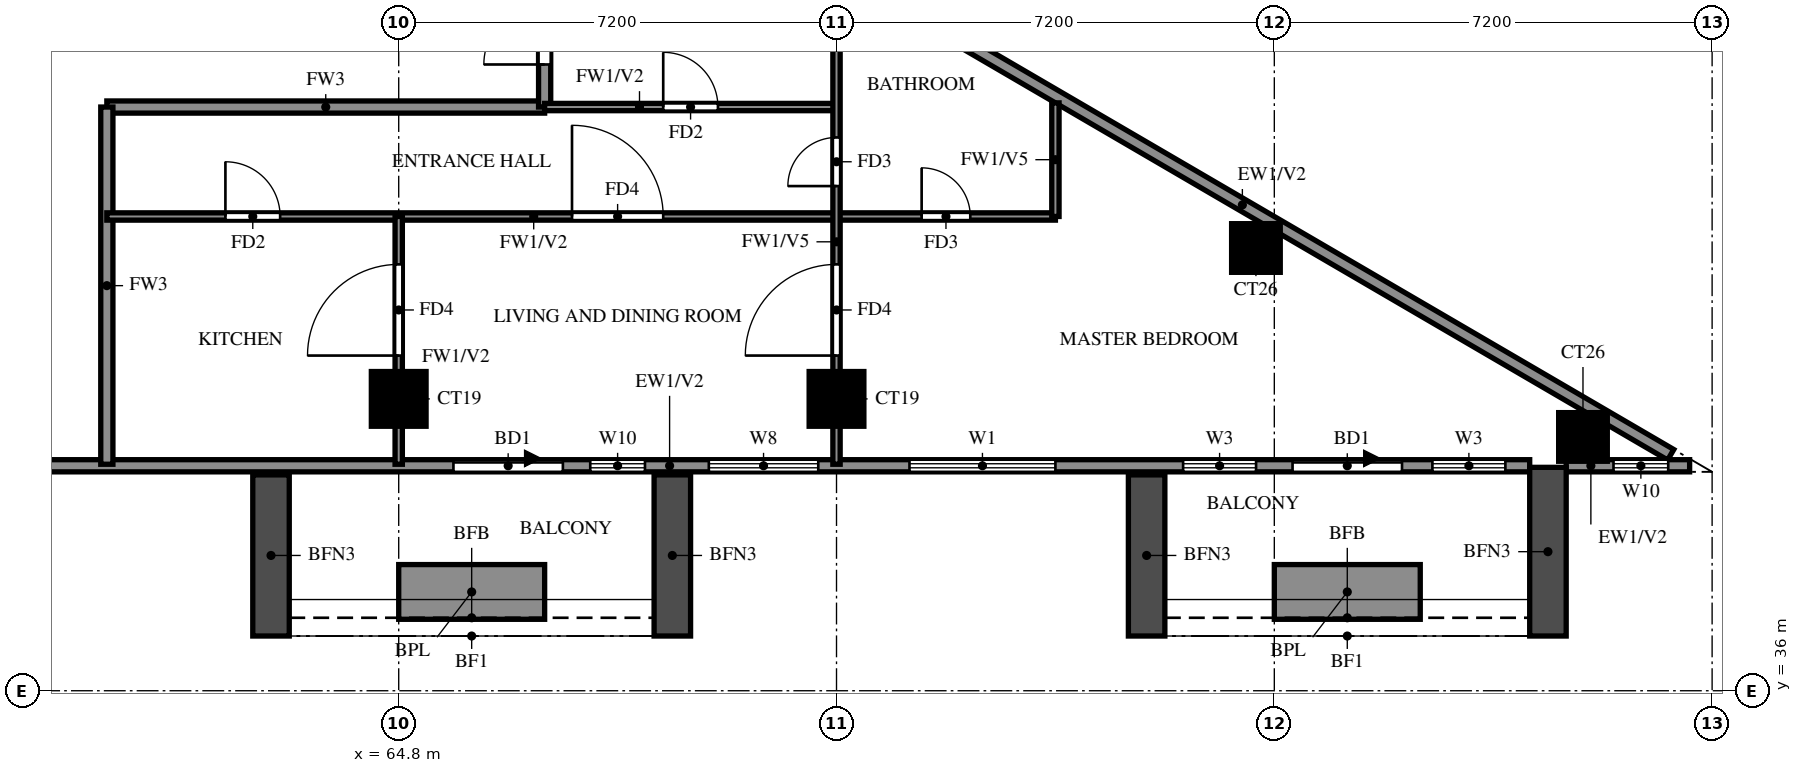
"""IFC4 building model, lengths in metres.
Left out: names, types, materials, properties, quantities, classifications, styles, units other than length and angle.
Written with IfcOpenShell. Run it as: python <this file> out.ifc"""

import sys

from ifc_helpers import new_model, si_unit, direction, frame, frame_2d, origin, origin_2d, place, context, subcontext, project, spatial, rectangle, extrude, source, transform, mapped, element, fill, save


model = new_model("IFC4")
c1 = context("Model", 3, precision=1e-05, world=origin(), true_north=direction((0.0, 1.0)))
c2 = subcontext(c1, "Body", "Model", "MODEL_VIEW")
j1 = project(units=[si_unit("LENGTHUNIT", "METRE"), si_unit("PLANEANGLEUNIT", "RADIAN")], contexts=[c1])
p1 = place(None, origin())
s1 = spatial("IfcSite", under=j1, at=p1, CompositionType="ELEMENT")
p2 = place(p1, origin())
s2 = spatial("IfcBuilding", under=s1, at=p2, CompositionType="ELEMENT")
p3 = place(p2, frame((0.0, 0.0, 192.0)))
s3 = spatial("IfcBuildingStorey", under=s2, at=p3, CompositionType="ELEMENT", Elevation=192.0)
m1 = source(origin(), c2, "Body", "SweptSolid", [
    extrude(rectangle(XDim=0.8, YDim=0.8, at=origin_2d()), origin(), (0.0, 0.0, 1.0), 3.2),
])
p4 = place(p3, frame((84.276, 40.174, 0.0), z_axis=(0.0, 0.0, 1.0), x_axis=(1.0, 0.0, 0.0)))
e1 = element("IfcColumn", 1, at=p4, inside=s3, PredefinedType="COLUMN", context=c2, shape_type="MappedRepresentation", body=[
    mapped(m1, transform((0.0, 0.0, 0.0))),
])
m2 = source(origin(), c2, "Body", "SweptSolid", [
    extrude(rectangle(XDim=0.9, YDim=0.9, at=origin_2d()), origin(), (0.0, 0.0, 1.0), 3.2),
])
for number, where, z_axis, x_axis in (
    (2, (64.8, 40.8, 0.0), (0.0, 0.0, 1.0), (1.0, 0.0, 0.0)),
    (3, (72.0, 40.8, 0.0), (0.0, 0.0, 1.0), (1.0, 0.0, 0.0)),
):
    element("IfcColumn", number, at=place(p3, frame(where, z_axis=z_axis, x_axis=x_axis)), inside=s3, PredefinedType="COLUMN", context=c2, shape_type="MappedRepresentation", body=[
        mapped(m2, transform((0.0, 0.0, 0.0))),
    ])
p5 = place(p3, frame((78.898, 43.282, 0.0), z_axis=(0.0, 0.0, 1.0), x_axis=(1.0, 0.0, 0.0)))
e4 = element("IfcColumn", 4, at=p5, inside=s3, PredefinedType="COLUMN", context=c2, shape_type="MappedRepresentation", body=[
    mapped(m1, transform((0.0, 0.0, 0.0))),
])
p6 = place(p3, frame((85.719, 39.881, 0.0), z_axis=(0.0, 0.0, 1.0), x_axis=(-0.86377618652, 0.503875678716, 0.0)))
e5 = element("IfcWall", 5, at=p6, inside=s3, PredefinedType="SOLIDWALL", context=c2, shape_type="SweptSolid", body=[
    extrude(rectangle(XDim=16.311, YDim=0.2, at=frame_2d((8.156, 0.0))), origin(), (0.0, 0.0, 1.0), 3.2),
])
p7 = place(p6, frame((13.326, 0.0, 1.5)))
e6 = element("IfcOpeningElement", 6, at=p7, cuts=e5, PredefinedType="OPENING", context=c2, shape_type="SweptSolid", body=[
    extrude(rectangle(XDim=0.9, YDim=0.9, at=frame_2d((0.45, 0.45))), frame((0.0, 0.11, 0.0), z_axis=(0.0, -1.0, 0.0), x_axis=(1.0, 0.0, 0.0)), (0.0, 0.0, 1.0), 0.22),
])
p8 = place(p3, frame((58.8, 39.7, 0.0), z_axis=(0.0, 0.0, 1.0), x_axis=(1.0, 0.0, 0.0)))
e7 = element("IfcWall", 7, at=p8, inside=s3, PredefinedType="SOLIDWALL", context=c2, shape_type="SweptSolid", body=[
    extrude(rectangle(XDim=24.6, YDim=0.2, at=frame_2d((12.3, 0.0))), origin(), (0.0, 0.0, 1.0), 3.2),
])
p9 = place(p8, frame((6.9, 0.0, 0.0)))
e8 = element("IfcOpeningElement", 8, at=p9, cuts=e7, PredefinedType="OPENING", context=c2, shape_type="SweptSolid", body=[
    extrude(rectangle(XDim=1.8, YDim=2.4, at=frame_2d((0.9, 1.2))), frame((0.0, 0.11, 0.0), z_axis=(0.0, -1.0, 0.0), x_axis=(1.0, 0.0, 0.0)), (0.0, 0.0, 1.0), 0.22),
])
p10 = place(p8, frame((20.7, 0.0, 0.0)))
e9 = element("IfcOpeningElement", 9, at=p10, cuts=e7, PredefinedType="OPENING", context=c2, shape_type="SweptSolid", body=[
    extrude(rectangle(XDim=1.8, YDim=2.4, at=frame_2d((0.9, 1.2))), frame((0.0, 0.11, 0.0), z_axis=(0.0, -1.0, 0.0), x_axis=(1.0, 0.0, 0.0)), (0.0, 0.0, 1.0), 0.22),
])
p11 = place(p8, frame((9.15, 0.0, 0.6)))
e10 = element("IfcOpeningElement", 10, at=p11, cuts=e7, PredefinedType="OPENING", context=c2, shape_type="SweptSolid", body=[
    extrude(rectangle(XDim=0.9, YDim=2.4, at=frame_2d((0.45, 1.2))), frame((0.0, 0.11, 0.0), z_axis=(0.0, -1.0, 0.0), x_axis=(1.0, 0.0, 0.0)), (0.0, 0.0, 1.0), 0.22),
])
p12 = place(p8, frame((11.1, 0.0, 0.6)))
e11 = element("IfcOpeningElement", 11, at=p12, cuts=e7, PredefinedType="OPENING", context=c2, shape_type="SweptSolid", body=[
    extrude(rectangle(XDim=1.8, YDim=2.4, at=frame_2d((0.9, 1.2))), frame((0.0, 0.11, 0.0), z_axis=(0.0, -1.0, 0.0), x_axis=(1.0, 0.0, 0.0)), (0.0, 0.0, 1.0), 0.22),
])
p13 = place(p8, frame((14.4, 0.0, 0.6)))
e12 = element("IfcOpeningElement", 12, at=p13, cuts=e7, PredefinedType="OPENING", context=c2, shape_type="SweptSolid", body=[
    extrude(rectangle(XDim=2.4, YDim=2.4, at=frame_2d((1.2, 1.2))), frame((0.0, 0.11, 0.0), z_axis=(0.0, -1.0, 0.0), x_axis=(1.0, 0.0, 0.0)), (0.0, 0.0, 1.0), 0.22),
])
p14 = place(p8, frame((18.9, 0.0, 0.6)))
e13 = element("IfcOpeningElement", 13, at=p14, cuts=e7, PredefinedType="OPENING", context=c2, shape_type="SweptSolid", body=[
    extrude(rectangle(XDim=1.2, YDim=2.4, at=frame_2d((0.6, 1.2))), frame((0.0, 0.11, 0.0), z_axis=(0.0, -1.0, 0.0), x_axis=(1.0, 0.0, 0.0)), (0.0, 0.0, 1.0), 0.22),
])
p15 = place(p8, frame((23.0, 0.0, 0.6)))
e14 = element("IfcOpeningElement", 14, at=p15, cuts=e7, PredefinedType="OPENING", context=c2, shape_type="SweptSolid", body=[
    extrude(rectangle(XDim=1.2, YDim=2.4, at=frame_2d((0.6, 1.2))), frame((0.0, 0.11, 0.0), z_axis=(0.0, -1.0, 0.0), x_axis=(1.0, 0.0, 0.0)), (0.0, 0.0, 1.0), 0.22),
])
p16 = place(p3, frame((84.0, 39.7, 0.0), z_axis=(0.0, 0.0, 1.0), x_axis=(1.0, 0.0, 0.0)))
e15 = element("IfcWall", 15, at=p16, inside=s3, PredefinedType="SOLIDWALL", context=c2, shape_type="SweptSolid", body=[
    extrude(rectangle(XDim=2.03, YDim=0.2, at=frame_2d((1.015, 0.0))), origin(), (0.0, 0.0, 1.0), 3.2),
])
p17 = place(p16, frame((0.778, 0.0, 0.6)))
e16 = element("IfcOpeningElement", 16, at=p17, cuts=e15, PredefinedType="OPENING", context=c2, shape_type="SweptSolid", body=[
    extrude(rectangle(XDim=0.9, YDim=2.4, at=frame_2d((0.45, 1.2))), frame((0.0, 0.11, 0.0), z_axis=(0.0, -1.0, 0.0), x_axis=(1.0, 0.0, 0.0)), (0.0, 0.0, 1.0), 0.22),
])
for number, where, z_axis, x_axis in (
    (17, (62.7, 39.55, 0.0), (0.0, 0.0, 1.0), (0.0, -1.0, 0.0)),
    (18, (69.3, 39.55, 0.0), (0.0, 0.0, 1.0), (0.0, -1.0, 0.0)),
):
    element("IfcWall", number, at=place(p3, frame(where, z_axis=z_axis, x_axis=x_axis)), inside=s3, PredefinedType="SOLIDWALL", context=c2, shape_type="SweptSolid", body=[
        extrude(rectangle(XDim=2.65, YDim=0.6, at=frame_2d((1.325, 0.0))), origin(), (0.0, 0.0, 1.0), 2.85),
    ])
p18 = place(p3, frame((64.8, 37.625, 0.0), z_axis=(0.0, 0.0, 1.0), x_axis=(1.0, 0.0, 0.0)))
e19 = element("IfcWall", 19, at=p18, inside=s3, PredefinedType="SOLIDWALL", context=c2, shape_type="SweptSolid", body=[
    extrude(rectangle(XDim=2.4, YDim=0.9, at=frame_2d((1.2, 0.0))), origin(), (0.0, 0.0, 1.0), 0.9),
])
p19 = place(p3, frame((77.1, 39.55, 0.0), z_axis=(0.0, 0.0, 1.0), x_axis=(0.0, -1.0, 0.0)))
e20 = element("IfcWall", 20, at=p19, inside=s3, PredefinedType="SOLIDWALL", context=c2, shape_type="SweptSolid", body=[
    extrude(rectangle(XDim=2.65, YDim=0.6, at=frame_2d((1.325, 0.0))), origin(), (0.0, 0.0, 1.0), 2.85),
])
p20 = place(p3, frame((83.7, 39.674, 0.0), z_axis=(0.0, 0.0, 1.0), x_axis=(0.0, -1.0, 0.0)))
e21 = element("IfcWall", 21, at=p20, inside=s3, PredefinedType="SOLIDWALL", context=c2, shape_type="SweptSolid", body=[
    extrude(rectangle(XDim=2.774, YDim=0.6, at=frame_2d((1.387, 0.0))), origin(), (0.0, 0.0, 1.0), 2.85),
])
p21 = place(p3, frame((79.2, 37.625, 0.0), z_axis=(0.0, 0.0, 1.0), x_axis=(1.0, 0.0, 0.0)))
e22 = element("IfcWall", 22, at=p21, inside=s3, PredefinedType="SOLIDWALL", context=c2, shape_type="SweptSolid", body=[
    extrude(rectangle(XDim=2.4, YDim=0.9, at=frame_2d((1.2, 0.0))), origin(), (0.0, 0.0, 1.0), 0.9),
])
p22 = place(p3, frame((60.0, 45.6, 0.0), z_axis=(0.0, 0.0, 1.0), x_axis=(1.0, 0.0, 0.0)))
e23 = element("IfcWall", 23, at=p22, inside=s3, PredefinedType="SOLIDWALL", context=c2, shape_type="SweptSolid", body=[
    extrude(rectangle(XDim=7.2, YDim=0.2, at=frame_2d((3.6, 0.0))), origin(), (0.0, 0.0, 1.0), 3.2),
])
p23 = place(p3, frame((60.0, 39.725, 0.0), z_axis=(0.0, 0.0, 1.0), x_axis=(0.0, 1.0, 0.0)))
e24 = element("IfcWall", 24, at=p23, inside=s3, PredefinedType="SOLIDWALL", context=c2, shape_type="SweptSolid", body=[
    extrude(rectangle(XDim=5.875, YDim=0.2, at=frame_2d((2.938, 0.0))), origin(), (0.0, 0.0, 1.0), 3.2),
])
p24 = place(p3, frame((67.2, 45.6, 0.0), z_axis=(0.0, 0.0, 1.0), x_axis=(0.0, 1.0, 0.0)))
e25 = element("IfcWall", 25, at=p24, inside=s3, PredefinedType="SOLIDWALL", context=c2, shape_type="SweptSolid", body=[
    extrude(rectangle(XDim=16.8, YDim=0.2, at=frame_2d((8.4, 0.0))), origin(), (0.0, 0.0, 1.0), 3.2),
])
p25 = place(p24, frame((8.3, 0.0, 0.0)))
e26 = element("IfcOpeningElement", 26, at=p25, cuts=e25, PredefinedType="OPENING", context=c2, shape_type="SweptSolid", body=[
    extrude(rectangle(XDim=1.0, YDim=2.1, at=frame_2d((0.5, 1.05))), frame((0.0, 0.11, 0.0), z_axis=(0.0, -1.0, 0.0), x_axis=(1.0, 0.0, 0.0)), (0.0, 0.0, 1.0), 0.22),
])
p26 = place(p24, frame((15.1, 0.0, 0.0)))
e27 = element("IfcOpeningElement", 27, at=p26, cuts=e25, PredefinedType="OPENING", context=c2, shape_type="SweptSolid", body=[
    extrude(rectangle(XDim=1.0, YDim=2.1, at=frame_2d((0.5, 1.05))), frame((0.0, 0.11, 0.0), z_axis=(0.0, -1.0, 0.0), x_axis=(1.0, 0.0, 0.0)), (0.0, 0.0, 1.0), 0.22),
])
p27 = place(p24, frame((0.7, 0.0, 0.0)))
e28 = element("IfcOpeningElement", 28, at=p27, cuts=e25, PredefinedType="OPENING", context=c2, shape_type="SweptSolid", body=[
    extrude(rectangle(XDim=1.0, YDim=2.1, at=frame_2d((0.5, 1.05))), frame((0.0, 0.11, 0.0), z_axis=(0.0, -1.0, 0.0), x_axis=(1.0, 0.0, 0.0)), (0.0, 0.0, 1.0), 0.22),
])
p28 = place(p3, frame((60.0, 43.8, 0.0), z_axis=(0.0, 0.0, 1.0), x_axis=(1.0, 0.0, 0.0)))
e29 = element("IfcWall", 29, at=p28, inside=s3, PredefinedType="PARTITIONING", context=c2, shape_type="SweptSolid", body=[
    extrude(rectangle(XDim=15.6, YDim=0.12, at=frame_2d((7.8, 0.0))), origin(), (0.0, 0.0, 1.0), 3.2),
])
p29 = place(p28, frame((7.65, 0.0, 0.0)))
e30 = element("IfcOpeningElement", 30, at=p29, cuts=e29, PredefinedType="OPENING", context=c2, shape_type="SweptSolid", body=[
    extrude(rectangle(XDim=1.5, YDim=2.1, at=frame_2d((0.75, 1.05))), frame((0.0, 0.07, 0.0), z_axis=(0.0, -1.0, 0.0), x_axis=(1.0, 0.0, 0.0)), (0.0, 0.0, 1.0), 0.14),
])
p30 = place(p28, frame((1.95, 0.0, 0.0)))
e31 = element("IfcOpeningElement", 31, at=p30, cuts=e29, PredefinedType="OPENING", context=c2, shape_type="SweptSolid", body=[
    extrude(rectangle(XDim=0.9, YDim=2.1, at=frame_2d((0.45, 1.05))), frame((0.0, 0.07, 0.0), z_axis=(0.0, -1.0, 0.0), x_axis=(1.0, 0.0, 0.0)), (0.0, 0.0, 1.0), 0.14),
])
p31 = place(p28, frame((13.4, 0.0, 0.0)))
e32 = element("IfcOpeningElement", 32, at=p31, cuts=e29, PredefinedType="OPENING", context=c2, shape_type="SweptSolid", body=[
    extrude(rectangle(XDim=0.8, YDim=2.1, at=frame_2d((0.4, 1.05))), frame((0.0, 0.07, 0.0), z_axis=(0.0, -1.0, 0.0), x_axis=(1.0, 0.0, 0.0)), (0.0, 0.0, 1.0), 0.14),
])
p32 = place(p3, frame((67.2, 45.6, 0.0), z_axis=(0.0, 0.0, 1.0), x_axis=(1.0, 0.0, 0.0)))
e33 = element("IfcWall", 33, at=p32, inside=s3, PredefinedType="PARTITIONING", context=c2, shape_type="SweptSolid", body=[
    extrude(rectangle(XDim=4.8, YDim=0.12, at=frame_2d((2.4, 0.0))), origin(), (0.0, 0.0, 1.0), 3.2),
])
p33 = place(p32, frame((1.95, 0.0, 0.0)))
e34 = element("IfcOpeningElement", 34, at=p33, cuts=e33, PredefinedType="OPENING", context=c2, shape_type="SweptSolid", body=[
    extrude(rectangle(XDim=0.9, YDim=2.1, at=frame_2d((0.45, 1.05))), frame((0.0, 0.07, 0.0), z_axis=(0.0, -1.0, 0.0), x_axis=(1.0, 0.0, 0.0)), (0.0, 0.0, 1.0), 0.14),
])
p34 = place(p3, frame((64.8, 39.725, 0.0), z_axis=(0.0, 0.0, 1.0), x_axis=(0.0, 1.0, 0.0)))
e35 = element("IfcWall", 35, at=p34, inside=s3, PredefinedType="PARTITIONING", context=c2, shape_type="SweptSolid", body=[
    extrude(rectangle(XDim=4.075, YDim=0.12, at=frame_2d((2.038, 0.0))), origin(), (0.0, 0.0, 1.0), 3.2),
])
p35 = place(p34, frame((1.788, 0.0, 0.0)))
e36 = element("IfcOpeningElement", 36, at=p35, cuts=e35, PredefinedType="OPENING", context=c2, shape_type="SweptSolid", body=[
    extrude(rectangle(XDim=1.5, YDim=2.1, at=frame_2d((0.75, 1.05))), frame((0.0, 0.07, 0.0), z_axis=(0.0, -1.0, 0.0), x_axis=(1.0, 0.0, 0.0)), (0.0, 0.0, 1.0), 0.14),
])
p36 = place(p3, frame((72.0, 39.725, 0.0), z_axis=(0.0, 0.0, 1.0), x_axis=(0.0, 1.0, 0.0)))
e37 = element("IfcWall", 37, at=p36, inside=s3, PredefinedType="PARTITIONING", context=c2, shape_type="SweptSolid", body=[
    extrude(rectangle(XDim=8.13, YDim=0.12, at=frame_2d((4.065, 0.0))), origin(), (0.0, 0.0, 1.0), 2.3),
])
p37 = place(p36, frame((1.788, 0.0, 0.0)))
e38 = element("IfcOpeningElement", 38, at=p37, cuts=e37, PredefinedType="OPENING", context=c2, shape_type="SweptSolid", body=[
    extrude(rectangle(XDim=1.5, YDim=2.1, at=frame_2d((0.75, 1.05))), frame((0.0, 0.07, 0.0), z_axis=(0.0, -1.0, 0.0), x_axis=(1.0, 0.0, 0.0)), (0.0, 0.0, 1.0), 0.14),
])
p38 = place(p36, frame((4.575, 0.0, 0.0)))
e39 = element("IfcOpeningElement", 39, at=p38, cuts=e37, PredefinedType="OPENING", context=c2, shape_type="SweptSolid", body=[
    extrude(rectangle(XDim=0.8, YDim=2.1, at=frame_2d((0.4, 1.05))), frame((0.0, 0.07, 0.0), z_axis=(0.0, -1.0, 0.0), x_axis=(1.0, 0.0, 0.0)), (0.0, 0.0, 1.0), 0.14),
])
p39 = place(p3, frame((75.6, 43.8, 0.0), z_axis=(0.0, 0.0, 1.0), x_axis=(0.0, 1.0, 0.0)))
e40 = element("IfcWall", 40, at=p39, inside=s3, PredefinedType="PARTITIONING", context=c2, shape_type="SweptSolid", body=[
    extrude(rectangle(XDim=1.868, YDim=0.12, at=frame_2d((0.934, 0.0))), origin(), (0.0, 0.0, 1.0), 2.3),
])
p40 = place(p9, origin())
e41 = element("IfcDoor", 41, at=p40, inside=s3, OperationType="DOUBLE_DOOR_SLIDING", PredefinedType="DOOR", context=c2, shape_type="SweptSolid", body=[
    extrude(rectangle(XDim=1.8, YDim=2.4, at=frame_2d((0.9, 1.2))), frame((0.0, 0.025, 0.0), z_axis=(0.0, -1.0, 0.0), x_axis=(1.0, 0.0, 0.0)), (0.0, 0.0, 1.0), 0.05),
])
fill(e8, e41)
p41 = place(p10, origin())
e42 = element("IfcDoor", 42, at=p41, inside=s3, OperationType="DOUBLE_DOOR_SLIDING", PredefinedType="DOOR", context=c2, shape_type="SweptSolid", body=[
    extrude(rectangle(XDim=1.8, YDim=2.4, at=frame_2d((0.9, 1.2))), frame((0.0, 0.025, 0.0), z_axis=(0.0, -1.0, 0.0), x_axis=(1.0, 0.0, 0.0)), (0.0, 0.0, 1.0), 0.05),
])
fill(e9, e42)
p42 = place(p11, origin())
e43 = element("IfcWindow", 43, at=p42, inside=s3, PartitioningType="SINGLE_PANEL", PredefinedType="WINDOW", context=c2, shape_type="SweptSolid", body=[
    extrude(rectangle(XDim=0.9, YDim=2.4, at=frame_2d((0.45, 1.2))), frame((0.0, 0.03, 0.0), z_axis=(0.0, -1.0, 0.0), x_axis=(1.0, 0.0, 0.0)), (0.0, 0.0, 1.0), 0.06),
])
fill(e10, e43)
p43 = place(p12, origin())
e44 = element("IfcWindow", 44, at=p43, inside=s3, PartitioningType="DOUBLE_PANEL_VERTICAL", PredefinedType="WINDOW", context=c2, shape_type="SweptSolid", body=[
    extrude(rectangle(XDim=1.8, YDim=2.4, at=frame_2d((0.9, 1.2))), frame((0.0, 0.03, 0.0), z_axis=(0.0, -1.0, 0.0), x_axis=(1.0, 0.0, 0.0)), (0.0, 0.0, 1.0), 0.06),
])
fill(e11, e44)
p44 = place(p13, origin())
e45 = element("IfcWindow", 45, at=p44, inside=s3, PartitioningType="DOUBLE_PANEL_VERTICAL", PredefinedType="WINDOW", context=c2, shape_type="SweptSolid", body=[
    extrude(rectangle(XDim=2.4, YDim=2.4, at=frame_2d((1.2, 1.2))), frame((0.0, 0.03, 0.0), z_axis=(0.0, -1.0, 0.0), x_axis=(1.0, 0.0, 0.0)), (0.0, 0.0, 1.0), 0.06),
])
fill(e12, e45)
p45 = place(p14, origin())
e46 = element("IfcWindow", 46, at=p45, inside=s3, PartitioningType="SINGLE_PANEL", PredefinedType="WINDOW", context=c2, shape_type="SweptSolid", body=[
    extrude(rectangle(XDim=1.2, YDim=2.4, at=frame_2d((0.6, 1.2))), frame((0.0, 0.03, 0.0), z_axis=(0.0, -1.0, 0.0), x_axis=(1.0, 0.0, 0.0)), (0.0, 0.0, 1.0), 0.06),
])
fill(e13, e46)
p46 = place(p15, origin())
e47 = element("IfcWindow", 47, at=p46, inside=s3, PartitioningType="SINGLE_PANEL", PredefinedType="WINDOW", context=c2, shape_type="SweptSolid", body=[
    extrude(rectangle(XDim=1.2, YDim=2.4, at=frame_2d((0.6, 1.2))), frame((0.0, 0.03, 0.0), z_axis=(0.0, -1.0, 0.0), x_axis=(1.0, 0.0, 0.0)), (0.0, 0.0, 1.0), 0.06),
])
fill(e14, e47)
p47 = place(p17, origin())
e48 = element("IfcWindow", 48, at=p47, inside=s3, PartitioningType="SINGLE_PANEL", PredefinedType="WINDOW", context=c2, shape_type="SweptSolid", body=[
    extrude(rectangle(XDim=0.9, YDim=2.4, at=frame_2d((0.45, 1.2))), frame((0.0, 0.03, 0.0), z_axis=(0.0, -1.0, 0.0), x_axis=(1.0, 0.0, 0.0)), (0.0, 0.0, 1.0), 0.06),
])
fill(e16, e48)
p48 = place(p35, origin())
e49 = element("IfcDoor", 49, at=p48, inside=s3, OperationType="SINGLE_SWING_RIGHT", PredefinedType="DOOR", context=c2, shape_type="SweptSolid", body=[
    extrude(rectangle(XDim=1.5, YDim=2.1, at=frame_2d((0.75, 1.05))), frame((0.0, 0.025, 0.0), z_axis=(0.0, -1.0, 0.0), x_axis=(1.0, 0.0, 0.0)), (0.0, 0.0, 1.0), 0.05),
])
fill(e36, e49)
p49 = place(p33, origin())
e50 = element("IfcDoor", 50, at=p49, inside=s3, OperationType="SINGLE_SWING_RIGHT", PredefinedType="DOOR", context=c2, shape_type="SweptSolid", body=[
    extrude(rectangle(XDim=0.9, YDim=2.1, at=frame_2d((0.45, 1.05))), frame((0.0, 0.025, 0.0), z_axis=(0.0, -1.0, 0.0), x_axis=(1.0, 0.0, 0.0)), (0.0, 0.0, 1.0), 0.05),
])
fill(e34, e50)
p50 = place(p27, origin())
e51 = element("IfcDoor", 51, at=p50, inside=s3, OperationType="SINGLE_SWING_LEFT", PredefinedType="DOOR", context=c2, shape_type="SweptSolid", body=[
    extrude(rectangle(XDim=1.0, YDim=2.1, at=frame_2d((0.5, 1.05))), frame((0.0, 0.025, 0.0), z_axis=(0.0, -1.0, 0.0), x_axis=(1.0, 0.0, 0.0)), (0.0, 0.0, 1.0), 0.05),
])
fill(e28, e51)
p51 = place(p29, origin())
e52 = element("IfcDoor", 52, at=p51, inside=s3, OperationType="SINGLE_SWING_LEFT", PredefinedType="DOOR", context=c2, shape_type="SweptSolid", body=[
    extrude(rectangle(XDim=1.5, YDim=2.1, at=frame_2d((0.75, 1.05))), frame((0.0, 0.025, 0.0), z_axis=(0.0, -1.0, 0.0), x_axis=(1.0, 0.0, 0.0)), (0.0, 0.0, 1.0), 0.05),
])
fill(e30, e52)
p52 = place(p30, origin())
e53 = element("IfcDoor", 53, at=p52, inside=s3, OperationType="SINGLE_SWING_RIGHT", PredefinedType="DOOR", context=c2, shape_type="SweptSolid", body=[
    extrude(rectangle(XDim=0.9, YDim=2.1, at=frame_2d((0.45, 1.05))), frame((0.0, 0.025, 0.0), z_axis=(0.0, -1.0, 0.0), x_axis=(1.0, 0.0, 0.0)), (0.0, 0.0, 1.0), 0.05),
])
fill(e31, e53)
p53 = place(p37, origin())
e54 = element("IfcDoor", 54, at=p53, inside=s3, OperationType="SINGLE_SWING_RIGHT", PredefinedType="DOOR", context=c2, shape_type="SweptSolid", body=[
    extrude(rectangle(XDim=1.5, YDim=2.1, at=frame_2d((0.75, 1.05))), frame((0.0, 0.025, 0.0), z_axis=(0.0, -1.0, 0.0), x_axis=(1.0, 0.0, 0.0)), (0.0, 0.0, 1.0), 0.05),
])
fill(e38, e54)
p54 = place(p38, origin())
e55 = element("IfcDoor", 55, at=p54, inside=s3, OperationType="SINGLE_SWING_LEFT", PredefinedType="DOOR", context=c2, shape_type="SweptSolid", body=[
    extrude(rectangle(XDim=0.8, YDim=2.1, at=frame_2d((0.4, 1.05))), frame((0.0, 0.025, 0.0), z_axis=(0.0, -1.0, 0.0), x_axis=(1.0, 0.0, 0.0)), (0.0, 0.0, 1.0), 0.05),
])
fill(e39, e55)
p55 = place(p31, origin())
e56 = element("IfcDoor", 56, at=p55, inside=s3, OperationType="SINGLE_SWING_RIGHT", PredefinedType="DOOR", context=c2, shape_type="SweptSolid", body=[
    extrude(rectangle(XDim=0.8, YDim=2.1, at=frame_2d((0.4, 1.05))), frame((0.0, 0.025, 0.0), z_axis=(0.0, -1.0, 0.0), x_axis=(1.0, 0.0, 0.0)), (0.0, 0.0, 1.0), 0.05),
])
fill(e32, e56)
save(model, sys.argv[1])
